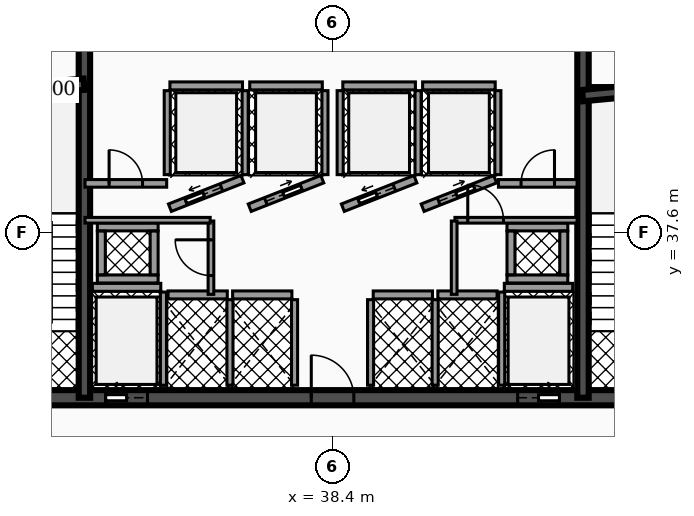
"""IFC4 building model, lengths in metres.
Left out: names, types, materials, properties, quantities, classifications, styles, units other than length and angle.
Written with IfcOpenShell. Run it as: python <this file> out.ifc"""

import sys

from ifc_helpers import new_model, si_unit, direction, frame, frame_2d, origin, place, context, subcontext, project, spatial, rectangle, extrude, element, fill, save


model = new_model("IFC4")
c1 = context("Model", 3, precision=1e-05, world=origin(), true_north=direction((0.0, 1.0)))
c2 = subcontext(c1, "Body", "Model", "MODEL_VIEW")
j1 = project(units=[si_unit("LENGTHUNIT", "METRE"), si_unit("PLANEANGLEUNIT", "RADIAN")], contexts=[c1])
p1 = place(None, origin())
s1 = spatial("IfcSite", under=j1, at=p1, CompositionType="ELEMENT")
p2 = place(p1, origin())
s2 = spatial("IfcBuilding", under=s1, at=p2, CompositionType="ELEMENT")
p3 = place(p2, frame((0.0, 0.0, 105.06)))
s3 = spatial("IfcBuildingStorey", under=s2, at=p3, CompositionType="ELEMENT", Elevation=105.06)
p4 = place(p3, frame((28.4, 33.25, 0.0), z_axis=(0.0, 0.0, 1.0), x_axis=(1.0, 0.0, 0.0)))
e1 = element("IfcWall", 1, at=p4, inside=s3, PredefinedType="SHEAR", context=c2, shape_type="SweptSolid", body=[
    extrude(rectangle(XDim=20.06, YDim=0.4, at=frame_2d((10.03, 0.0))), origin(), (0.0, 0.0, 1.0), 3.73),
])
p5 = place(p4, frame((4.03, 0.0, 0.0)))
e2 = element("IfcOpeningElement", 2, at=p5, cuts=e1, PredefinedType="OPENING", context=c2, shape_type="SweptSolid", body=[
    extrude(rectangle(XDim=1.1, YDim=2.15, at=frame_2d((0.55, 1.075))), frame((0.0, 0.21, 0.0), z_axis=(0.0, -1.0, 0.0), x_axis=(1.0, 0.0, 0.0)), (0.0, 0.0, 1.0), 0.42),
])
p6 = place(p4, frame((14.87, 0.0, 0.0)))
e3 = element("IfcOpeningElement", 3, at=p6, cuts=e1, PredefinedType="OPENING", context=c2, shape_type="SweptSolid", body=[
    extrude(rectangle(XDim=1.1, YDim=2.15, at=frame_2d((0.55, 1.075))), frame((0.0, 0.21, 0.0), z_axis=(0.0, -1.0, 0.0), x_axis=(1.0, 0.0, 0.0)), (0.0, 0.0, 1.0), 0.42),
])
p7 = place(p4, frame((1.31, 0.0, 0.0)))
e4 = element("IfcOpeningElement", 4, at=p7, cuts=e1, PredefinedType="OPENING", context=c2, shape_type="SweptSolid", body=[
    extrude(rectangle(XDim=1.1, YDim=2.2, at=frame_2d((0.55, 1.1))), frame((0.0, 0.21, 0.0), z_axis=(0.0, -1.0, 0.0), x_axis=(1.0, 0.0, 0.0)), (0.0, 0.0, 1.0), 0.42),
])
p8 = place(p4, frame((9.44, 0.0, 0.0)))
e5 = element("IfcOpeningElement", 5, at=p8, cuts=e1, PredefinedType="OPENING", context=c2, shape_type="SweptSolid", body=[
    extrude(rectangle(XDim=1.12, YDim=2.05, at=frame_2d((0.56, 1.025))), frame((0.0, 0.21, 0.0), z_axis=(0.0, -1.0, 0.0), x_axis=(1.0, 0.0, 0.0)), (0.0, 0.0, 1.0), 0.42),
])
p9 = place(p4, frame((17.65, 0.0, 0.0)))
e6 = element("IfcOpeningElement", 6, at=p9, cuts=e1, PredefinedType="OPENING", context=c2, shape_type="SweptSolid", body=[
    extrude(rectangle(XDim=1.1, YDim=2.2, at=frame_2d((0.55, 1.1))), frame((0.0, 0.21, 0.0), z_axis=(0.0, -1.0, 0.0), x_axis=(1.0, 0.0, 0.0)), (0.0, 0.0, 1.0), 0.42),
])
for number, where, z_axis, x_axis in (
    (7, (31.87, 33.25, 0.0), (0.0, 0.0, 1.0), (0.0, 1.0, 0.0)),
    (8, (44.99, 33.25, 0.0), (0.0, 0.0, 1.0), (0.0, 1.0, 0.0)),
):
    element("IfcWall", number, at=place(p3, frame(where, z_axis=z_axis, x_axis=x_axis)), inside=s3, PredefinedType="SHEAR", context=c2, shape_type="SweptSolid", body=[
        extrude(rectangle(XDim=10.2, YDim=0.3, at=frame_2d((5.1, 0.0))), origin(), (0.0, 0.0, 1.0), 3.73),
    ])
p10 = place(p3, frame((28.64, 41.2, 0.0), z_axis=(0.0, 0.0, 1.0), x_axis=(0.995687118776, 0.092774789157, 0.0)))
e9 = element("IfcWall", 9, at=p10, inside=s3, PredefinedType="SHEAR", context=c2, shape_type="SweptSolid", body=[
    extrude(rectangle(XDim=3.234, YDim=0.3, at=frame_2d((1.617, 0.0))), origin(), (0.0, 0.0, 1.0), 3.73),
])
p11 = place(p3, frame((44.98, 41.2, 0.0), z_axis=(0.0, 0.0, 1.0), x_axis=(0.995686468965, 0.09278176286, 0.0)))
e10 = element("IfcWall", 10, at=p11, inside=s3, PredefinedType="SHEAR", context=c2, shape_type="SweptSolid", body=[
    extrude(rectangle(XDim=3.234, YDim=0.3, at=frame_2d((1.617, 0.0))), origin(), (0.0, 0.0, 1.0), 3.73),
])
p12 = place(p3, frame((32.08, 36.155, 0.0), z_axis=(0.0, 0.0, 1.0), x_axis=(1.0, 0.0, 0.0)))
e11 = element("IfcWall", 11, at=p12, inside=s3, PredefinedType="SOLIDWALL", context=c2, shape_type="SweptSolid", body=[
    extrude(rectangle(XDim=1.8, YDim=0.21, at=frame_2d((0.9, 0.0))), origin(), (0.0, 0.0, 1.0), 2.702),
])
p13 = place(p3, frame((33.95, 33.58, 0.0), z_axis=(0.0, 0.0, 1.0), x_axis=(0.0, 1.0, 0.0)))
e12 = element("IfcWall", 12, at=p13, inside=s3, PredefinedType="SOLIDWALL", context=c2, shape_type="SweptSolid", body=[
    extrude(rectangle(XDim=2.45, YDim=0.16, at=frame_2d((1.225, 0.0))), origin(), (0.0, 0.0, 1.0), 2.702),
])
p14 = place(p3, frame((42.92, 36.155, 0.0), z_axis=(0.0, 0.0, 1.0), x_axis=(1.0, 0.0, 0.0)))
e13 = element("IfcWall", 13, at=p14, inside=s3, PredefinedType="SOLIDWALL", context=c2, shape_type="SweptSolid", body=[
    extrude(rectangle(XDim=1.8, YDim=0.21, at=frame_2d((0.9, 0.0))), origin(), (0.0, 0.0, 1.0), 2.702),
])
p15 = place(p3, frame((42.85, 33.58, 0.0), z_axis=(0.0, 0.0, 1.0), x_axis=(0.0, 1.0, 0.0)))
e14 = element("IfcWall", 14, at=p15, inside=s3, PredefinedType="SOLIDWALL", context=c2, shape_type="SweptSolid", body=[
    extrude(rectangle(XDim=2.45, YDim=0.16, at=frame_2d((1.225, 0.0))), origin(), (0.0, 0.0, 1.0), 2.702),
])
p16 = place(p3, frame((34.12, 38.25, 0.0), z_axis=(0.0, 0.0, 1.0), x_axis=(0.930804993012, 0.36551616241, 0.0)))
e15 = element("IfcWall", 15, at=p16, inside=s3, PredefinedType="SOLIDWALL", context=c2, shape_type="SweptSolid", body=[
    extrude(rectangle(XDim=2.052, YDim=0.21, at=frame_2d((1.026, 0.0))), origin(), (0.0, 0.0, 1.0), 2.702),
])
p17 = place(p16, frame((0.455, 0.0, 0.0)))
e16 = element("IfcOpeningElement", 16, at=p17, cuts=e15, PredefinedType="OPENING", context=c2, shape_type="SweptSolid", body=[
    extrude(rectangle(XDim=1.0, YDim=2.1, at=frame_2d((0.5, 1.05))), frame((0.0, 0.115, 0.0), z_axis=(0.0, -1.0, 0.0), x_axis=(1.0, 0.0, 0.0)), (0.0, 0.0, 1.0), 0.23),
])
p18 = place(p3, frame((34.12, 41.455, 0.0), z_axis=(0.0, 0.0, 1.0), x_axis=(1.0, 0.0, 0.0)))
e17 = element("IfcWall", 17, at=p18, inside=s3, PredefinedType="SOLIDWALL", context=c2, shape_type="SweptSolid", body=[
    extrude(rectangle(XDim=1.91, YDim=0.21, at=frame_2d((0.955, 0.0))), origin(), (0.0, 0.0, 1.0), 2.702),
])
for number, where, z_axis, x_axis in (
    (18, (34.05, 39.12, 0.0), (0.0, 0.0, 1.0), (0.0, 1.0, 0.0)),
    (19, (36.1, 39.12, 0.0), (0.0, 0.0, 1.0), (0.0, 1.0, 0.0)),
):
    element("IfcWall", number, at=place(p3, frame(where, z_axis=z_axis, x_axis=x_axis)), inside=s3, PredefinedType="SOLIDWALL", context=c2, shape_type="SweptSolid", body=[
        extrude(rectangle(XDim=2.21, YDim=0.16, at=frame_2d((1.105, 0.0))), origin(), (0.0, 0.0, 1.0), 2.702),
    ])
p19 = place(p3, frame((36.22, 38.25, 0.0), z_axis=(0.0, 0.0, 1.0), x_axis=(0.930804993012, 0.36551616241, 0.0)))
e20 = element("IfcWall", 20, at=p19, inside=s3, PredefinedType="SOLIDWALL", context=c2, shape_type="SweptSolid", body=[
    extrude(rectangle(XDim=2.052, YDim=0.21, at=frame_2d((1.026, 0.0))), origin(), (0.0, 0.0, 1.0), 2.702),
])
p20 = place(p19, frame((0.455, 0.0, 0.0)))
e21 = element("IfcOpeningElement", 21, at=p20, cuts=e20, PredefinedType="OPENING", context=c2, shape_type="SweptSolid", body=[
    extrude(rectangle(XDim=1.0, YDim=2.1, at=frame_2d((0.5, 1.05))), frame((0.0, 0.115, 0.0), z_axis=(0.0, -1.0, 0.0), x_axis=(1.0, 0.0, 0.0)), (0.0, 0.0, 1.0), 0.23),
])
p21 = place(p3, frame((36.22, 41.455, 0.0), z_axis=(0.0, 0.0, 1.0), x_axis=(1.0, 0.0, 0.0)))
e22 = element("IfcWall", 22, at=p21, inside=s3, PredefinedType="SOLIDWALL", context=c2, shape_type="SweptSolid", body=[
    extrude(rectangle(XDim=1.91, YDim=0.21, at=frame_2d((0.955, 0.0))), origin(), (0.0, 0.0, 1.0), 2.702),
])
p22 = place(p3, frame((38.2, 39.12, 0.0), z_axis=(0.0, 0.0, 1.0), x_axis=(0.0, 1.0, 0.0)))
e23 = element("IfcWall", 23, at=p22, inside=s3, PredefinedType="SOLIDWALL", context=c2, shape_type="SweptSolid", body=[
    extrude(rectangle(XDim=2.21, YDim=0.16, at=frame_2d((1.105, 0.0))), origin(), (0.0, 0.0, 1.0), 2.702),
])
p23 = place(p3, frame((38.67, 38.25, 0.0), z_axis=(0.0, 0.0, 1.0), x_axis=(0.930820886763, 0.3654756856, 0.0)))
e24 = element("IfcWall", 24, at=p23, inside=s3, PredefinedType="SOLIDWALL", context=c2, shape_type="SweptSolid", body=[
    extrude(rectangle(XDim=2.052, YDim=0.21, at=frame_2d((1.026, 0.0))), origin(), (0.0, 0.0, 1.0), 2.702),
])
p24 = place(p23, frame((0.455, 0.0, 0.0)))
e25 = element("IfcOpeningElement", 25, at=p24, cuts=e24, PredefinedType="OPENING", context=c2, shape_type="SweptSolid", body=[
    extrude(rectangle(XDim=1.0, YDim=2.1, at=frame_2d((0.5, 1.05))), frame((0.0, 0.115, 0.0), z_axis=(0.0, -1.0, 0.0), x_axis=(1.0, 0.0, 0.0)), (0.0, 0.0, 1.0), 0.23),
])
p25 = place(p3, frame((38.67, 41.455, 0.0), z_axis=(0.0, 0.0, 1.0), x_axis=(1.0, 0.0, 0.0)))
e26 = element("IfcWall", 26, at=p25, inside=s3, PredefinedType="SOLIDWALL", context=c2, shape_type="SweptSolid", body=[
    extrude(rectangle(XDim=1.91, YDim=0.21, at=frame_2d((0.955, 0.0))), origin(), (0.0, 0.0, 1.0), 2.702),
])
for number, where, z_axis, x_axis in (
    (27, (38.6, 39.12, 0.0), (0.0, 0.0, 1.0), (0.0, 1.0, 0.0)),
    (28, (40.65, 39.12, 0.0), (0.0, 0.0, 1.0), (0.0, 1.0, 0.0)),
):
    element("IfcWall", number, at=place(p3, frame(where, z_axis=z_axis, x_axis=x_axis)), inside=s3, PredefinedType="SOLIDWALL", context=c2, shape_type="SweptSolid", body=[
        extrude(rectangle(XDim=2.21, YDim=0.16, at=frame_2d((1.105, 0.0))), origin(), (0.0, 0.0, 1.0), 2.702),
    ])
p26 = place(p3, frame((40.77, 38.25, 0.0), z_axis=(0.0, 0.0, 1.0), x_axis=(0.930804993012, 0.36551616241, 0.0)))
e29 = element("IfcWall", 29, at=p26, inside=s3, PredefinedType="SOLIDWALL", context=c2, shape_type="SweptSolid", body=[
    extrude(rectangle(XDim=2.052, YDim=0.21, at=frame_2d((1.026, 0.0))), origin(), (0.0, 0.0, 1.0), 2.702),
])
p27 = place(p26, frame((0.455, 0.0, 0.0)))
e30 = element("IfcOpeningElement", 30, at=p27, cuts=e29, PredefinedType="OPENING", context=c2, shape_type="SweptSolid", body=[
    extrude(rectangle(XDim=1.0, YDim=2.1, at=frame_2d((0.5, 1.05))), frame((0.0, 0.115, 0.0), z_axis=(0.0, -1.0, 0.0), x_axis=(1.0, 0.0, 0.0)), (0.0, 0.0, 1.0), 0.23),
])
p28 = place(p3, frame((40.77, 41.455, 0.0), z_axis=(0.0, 0.0, 1.0), x_axis=(1.0, 0.0, 0.0)))
e31 = element("IfcWall", 31, at=p28, inside=s3, PredefinedType="SOLIDWALL", context=c2, shape_type="SweptSolid", body=[
    extrude(rectangle(XDim=1.91, YDim=0.21, at=frame_2d((0.955, 0.0))), origin(), (0.0, 0.0, 1.0), 2.702),
])
p29 = place(p3, frame((42.75, 39.12, 0.0), z_axis=(0.0, 0.0, 1.0), x_axis=(0.0, 1.0, 0.0)))
e32 = element("IfcWall", 32, at=p29, inside=s3, PredefinedType="SOLIDWALL", context=c2, shape_type="SweptSolid", body=[
    extrude(rectangle(XDim=2.21, YDim=0.16, at=frame_2d((1.105, 0.0))), origin(), (0.0, 0.0, 1.0), 2.702),
])
p30 = place(p3, frame((34.07, 35.955, 0.0), z_axis=(0.0, 0.0, 1.0), x_axis=(1.0, 0.0, 0.0)))
e33 = element("IfcWall", 33, at=p30, inside=s3, PredefinedType="SOLIDWALL", context=c2, shape_type="SweptSolid", body=[
    extrude(rectangle(XDim=1.56, YDim=0.21, at=frame_2d((0.78, 0.0))), origin(), (0.0, 0.0, 1.0), 2.702),
])
p31 = place(p3, frame((35.7, 33.58, 0.0), z_axis=(0.0, 0.0, 1.0), x_axis=(0.0, 1.0, 0.0)))
e34 = element("IfcWall", 34, at=p31, inside=s3, PredefinedType="SOLIDWALL", context=c2, shape_type="SweptSolid", body=[
    extrude(rectangle(XDim=2.25, YDim=0.16, at=frame_2d((1.125, 0.0))), origin(), (0.0, 0.0, 1.0), 2.702),
])
p32 = place(p3, frame((35.77, 35.955, 0.0), z_axis=(0.0, 0.0, 1.0), x_axis=(1.0, 0.0, 0.0)))
e35 = element("IfcWall", 35, at=p32, inside=s3, PredefinedType="SOLIDWALL", context=c2, shape_type="SweptSolid", body=[
    extrude(rectangle(XDim=1.56, YDim=0.21, at=frame_2d((0.78, 0.0))), origin(), (0.0, 0.0, 1.0), 2.702),
])
p33 = place(p3, frame((37.4, 33.58, 0.0), z_axis=(0.0, 0.0, 1.0), x_axis=(0.0, 1.0, 0.0)))
e36 = element("IfcWall", 36, at=p33, inside=s3, PredefinedType="SOLIDWALL", context=c2, shape_type="SweptSolid", body=[
    extrude(rectangle(XDim=2.25, YDim=0.16, at=frame_2d((1.125, 0.0))), origin(), (0.0, 0.0, 1.0), 2.702),
])
p34 = place(p3, frame((39.47, 35.955, 0.0), z_axis=(0.0, 0.0, 1.0), x_axis=(1.0, 0.0, 0.0)))
e37 = element("IfcWall", 37, at=p34, inside=s3, PredefinedType="SOLIDWALL", context=c2, shape_type="SweptSolid", body=[
    extrude(rectangle(XDim=1.56, YDim=0.21, at=frame_2d((0.78, 0.0))), origin(), (0.0, 0.0, 1.0), 2.702),
])
for number, where, z_axis, x_axis in (
    (38, (39.4, 33.58, 0.0), (0.0, 0.0, 1.0), (0.0, 1.0, 0.0)),
    (39, (41.1, 33.58, 0.0), (0.0, 0.0, 1.0), (0.0, 1.0, 0.0)),
):
    element("IfcWall", number, at=place(p3, frame(where, z_axis=z_axis, x_axis=x_axis)), inside=s3, PredefinedType="SOLIDWALL", context=c2, shape_type="SweptSolid", body=[
        extrude(rectangle(XDim=2.25, YDim=0.16, at=frame_2d((1.125, 0.0))), origin(), (0.0, 0.0, 1.0), 2.702),
    ])
p35 = place(p3, frame((41.17, 35.955, 0.0), z_axis=(0.0, 0.0, 1.0), x_axis=(1.0, 0.0, 0.0)))
e40 = element("IfcWall", 40, at=p35, inside=s3, PredefinedType="SOLIDWALL", context=c2, shape_type="SweptSolid", body=[
    extrude(rectangle(XDim=1.56, YDim=0.21, at=frame_2d((0.78, 0.0))), origin(), (0.0, 0.0, 1.0), 2.702),
])
for number, where, z_axis, x_axis in (
    (41, (32.21, 36.375, 0.0), (0.0, 0.0, 1.0), (1.0, 0.0, 0.0)),
    (42, (32.21, 37.745, 0.0), (0.0, 0.0, 1.0), (1.0, 0.0, 0.0)),
):
    element("IfcWall", number, at=place(p3, frame(where, z_axis=z_axis, x_axis=x_axis)), inside=s3, PredefinedType="SOLIDWALL", context=c2, shape_type="SweptSolid", body=[
        extrude(rectangle(XDim=1.6, YDim=0.21, at=frame_2d((0.8, 0.0))), origin(), (0.0, 0.0, 1.0), 3.73),
    ])
for number, where, z_axis, x_axis in (
    (43, (32.315, 36.485, 0.0), (0.0, 0.0, 1.0), (0.0, 1.0, 0.0)),
    (44, (33.705, 36.485, 0.0), (0.0, 0.0, 1.0), (0.0, 1.0, 0.0)),
):
    element("IfcWall", number, at=place(p3, frame(where, z_axis=z_axis, x_axis=x_axis)), inside=s3, PredefinedType="SOLIDWALL", context=c2, shape_type="SweptSolid", body=[
        extrude(rectangle(XDim=1.15, YDim=0.21, at=frame_2d((0.575, 0.0))), origin(), (0.0, 0.0, 1.0), 3.73),
    ])
for number, where, z_axis, x_axis in (
    (45, (42.99, 36.375, 0.0), (0.0, 0.0, 1.0), (1.0, 0.0, 0.0)),
    (46, (42.99, 37.745, 0.0), (0.0, 0.0, 1.0), (1.0, 0.0, 0.0)),
):
    element("IfcWall", number, at=place(p3, frame(where, z_axis=z_axis, x_axis=x_axis)), inside=s3, PredefinedType="SOLIDWALL", context=c2, shape_type="SweptSolid", body=[
        extrude(rectangle(XDim=1.6, YDim=0.21, at=frame_2d((0.8, 0.0))), origin(), (0.0, 0.0, 1.0), 3.73),
    ])
for number, where, z_axis, x_axis in (
    (47, (43.095, 36.485, 0.0), (0.0, 0.0, 1.0), (0.0, 1.0, 0.0)),
    (48, (44.485, 36.485, 0.0), (0.0, 0.0, 1.0), (0.0, 1.0, 0.0)),
):
    element("IfcWall", number, at=place(p3, frame(where, z_axis=z_axis, x_axis=x_axis)), inside=s3, PredefinedType="SOLIDWALL", context=c2, shape_type="SweptSolid", body=[
        extrude(rectangle(XDim=1.15, YDim=0.21, at=frame_2d((0.575, 0.0))), origin(), (0.0, 0.0, 1.0), 3.73),
    ])
p36 = place(p3, frame((35.2, 35.97, 0.0), z_axis=(0.0, 0.0, 1.0), x_axis=(0.0, 1.0, 0.0)))
e49 = element("IfcWall", 49, at=p36, inside=s3, PredefinedType="PARTITIONING", context=c2, shape_type="SweptSolid", body=[
    extrude(rectangle(XDim=1.93, YDim=0.15, at=frame_2d((0.965, 0.0))), origin(), (0.0, 0.0, 1.0), 2.687),
])
p37 = place(p36, frame((0.495, 0.0, 0.0)))
e50 = element("IfcOpeningElement", 50, at=p37, cuts=e49, PredefinedType="OPENING", context=c2, shape_type="SweptSolid", body=[
    extrude(rectangle(XDim=0.94, YDim=2.05, at=frame_2d((0.47, 1.025))), frame((0.0, 0.085, 0.0), z_axis=(0.0, -1.0, 0.0), x_axis=(1.0, 0.0, 0.0)), (0.0, 0.0, 1.0), 0.17),
])
p38 = place(p3, frame((31.885, 37.92, 0.0), z_axis=(0.0, 0.0, 1.0), x_axis=(1.0, 0.0, 0.0)))
e51 = element("IfcWall", 51, at=p38, inside=s3, PredefinedType="PARTITIONING", context=c2, shape_type="SweptSolid", body=[
    extrude(rectangle(XDim=3.295, YDim=0.15, at=frame_2d((1.647, 0.0))), origin(), (0.0, 0.0, 1.0), 2.687),
])
p39 = place(p3, frame((31.885, 38.89, 0.0), z_axis=(0.0, 0.0, 1.0), x_axis=(1.0, 0.0, 0.0)))
e52 = element("IfcWall", 52, at=p39, inside=s3, PredefinedType="PARTITIONING", context=c2, shape_type="SweptSolid", body=[
    extrude(rectangle(XDim=2.15, YDim=0.2, at=frame_2d((1.075, 0.0))), origin(), (0.0, 0.0, 1.0), 2.687),
])
p40 = place(p39, frame((0.635, 0.0, 0.0)))
e53 = element("IfcOpeningElement", 53, at=p40, cuts=e52, PredefinedType="OPENING", context=c2, shape_type="SweptSolid", body=[
    extrude(rectangle(XDim=0.88, YDim=2.05, at=frame_2d((0.44, 1.025))), frame((0.0, 0.11, 0.0), z_axis=(0.0, -1.0, 0.0), x_axis=(1.0, 0.0, 0.0)), (0.0, 0.0, 1.0), 0.22),
])
p41 = place(p3, frame((42.765, 38.89, 0.0), z_axis=(0.0, 0.0, 1.0), x_axis=(1.0, 0.0, 0.0)))
e54 = element("IfcWall", 54, at=p41, inside=s3, PredefinedType="PARTITIONING", context=c2, shape_type="SweptSolid", body=[
    extrude(rectangle(XDim=2.07, YDim=0.2, at=frame_2d((1.035, 0.0))), origin(), (0.0, 0.0, 1.0), 2.687),
])
p42 = place(p41, frame((0.595, 0.0, 0.0)))
e55 = element("IfcOpeningElement", 55, at=p42, cuts=e54, PredefinedType="OPENING", context=c2, shape_type="SweptSolid", body=[
    extrude(rectangle(XDim=0.88, YDim=2.05, at=frame_2d((0.44, 1.025))), frame((0.0, 0.11, 0.0), z_axis=(0.0, -1.0, 0.0), x_axis=(1.0, 0.0, 0.0)), (0.0, 0.0, 1.0), 0.22),
])
p43 = place(p3, frame((41.62, 37.92, 0.0), z_axis=(0.0, 0.0, 1.0), x_axis=(1.0, 0.0, 0.0)))
e56 = element("IfcWall", 56, at=p43, inside=s3, PredefinedType="PARTITIONING", context=c2, shape_type="SweptSolid", body=[
    extrude(rectangle(XDim=3.215, YDim=0.15, at=frame_2d((1.607, 0.0))), origin(), (0.0, 0.0, 1.0), 2.687),
])
p44 = place(p43, frame((0.337, 0.0, 0.0)))
e57 = element("IfcOpeningElement", 57, at=p44, cuts=e56, PredefinedType="OPENING", context=c2, shape_type="SweptSolid", body=[
    extrude(rectangle(XDim=0.94, YDim=2.05, at=frame_2d((0.47, 1.025))), frame((0.0, 0.085, 0.0), z_axis=(0.0, -1.0, 0.0), x_axis=(1.0, 0.0, 0.0)), (0.0, 0.0, 1.0), 0.17),
])
p45 = place(p3, frame((41.6, 35.97, 0.0), z_axis=(0.0, 0.0, 1.0), x_axis=(0.0, 1.0, 0.0)))
e58 = element("IfcWall", 58, at=p45, inside=s3, PredefinedType="PARTITIONING", context=c2, shape_type="SweptSolid", body=[
    extrude(rectangle(XDim=1.93, YDim=0.15, at=frame_2d((0.965, 0.0))), origin(), (0.0, 0.0, 1.0), 2.687),
])
p46 = place(p5, origin())
e59 = element("IfcDoor", 59, at=p46, inside=s3, OperationType="SLIDING_TO_LEFT", PredefinedType="DOOR", context=c2, shape_type="SweptSolid", body=[
    extrude(rectangle(XDim=1.1, YDim=2.15, at=frame_2d((0.55, 1.075))), frame((0.0, 0.025, 0.0), z_axis=(0.0, -1.0, 0.0), x_axis=(1.0, 0.0, 0.0)), (0.0, 0.0, 1.0), 0.05),
])
fill(e2, e59)
p47 = place(p6, origin())
e60 = element("IfcDoor", 60, at=p47, inside=s3, OperationType="SLIDING_TO_RIGHT", PredefinedType="DOOR", context=c2, shape_type="SweptSolid", body=[
    extrude(rectangle(XDim=1.1, YDim=2.15, at=frame_2d((0.55, 1.075))), frame((0.0, 0.025, 0.0), z_axis=(0.0, -1.0, 0.0), x_axis=(1.0, 0.0, 0.0)), (0.0, 0.0, 1.0), 0.05),
])
fill(e3, e60)
p48 = place(p17, origin())
e61 = element("IfcDoor", 61, at=p48, inside=s3, OperationType="SLIDING_TO_LEFT", PredefinedType="DOOR", context=c2, shape_type="SweptSolid", body=[
    extrude(rectangle(XDim=1.0, YDim=2.1, at=frame_2d((0.5, 1.05))), frame((0.0, 0.025, 0.0), z_axis=(0.0, -1.0, 0.0), x_axis=(1.0, 0.0, 0.0)), (0.0, 0.0, 1.0), 0.05),
])
fill(e16, e61)
p49 = place(p20, origin())
e62 = element("IfcDoor", 62, at=p49, inside=s3, OperationType="SLIDING_TO_RIGHT", PredefinedType="DOOR", context=c2, shape_type="SweptSolid", body=[
    extrude(rectangle(XDim=1.0, YDim=2.1, at=frame_2d((0.5, 1.05))), frame((0.0, 0.025, 0.0), z_axis=(0.0, -1.0, 0.0), x_axis=(1.0, 0.0, 0.0)), (0.0, 0.0, 1.0), 0.05),
])
fill(e21, e62)
p50 = place(p24, origin())
e63 = element("IfcDoor", 63, at=p50, inside=s3, OperationType="SLIDING_TO_LEFT", PredefinedType="DOOR", context=c2, shape_type="SweptSolid", body=[
    extrude(rectangle(XDim=1.0, YDim=2.1, at=frame_2d((0.5, 1.05))), frame((0.0, 0.025, 0.0), z_axis=(0.0, -1.0, 0.0), x_axis=(1.0, 0.0, 0.0)), (0.0, 0.0, 1.0), 0.05),
])
fill(e25, e63)
p51 = place(p27, origin())
e64 = element("IfcDoor", 64, at=p51, inside=s3, OperationType="SLIDING_TO_RIGHT", PredefinedType="DOOR", context=c2, shape_type="SweptSolid", body=[
    extrude(rectangle(XDim=1.0, YDim=2.1, at=frame_2d((0.5, 1.05))), frame((0.0, 0.025, 0.0), z_axis=(0.0, -1.0, 0.0), x_axis=(1.0, 0.0, 0.0)), (0.0, 0.0, 1.0), 0.05),
])
fill(e30, e64)
p52 = place(p8, origin())
e65 = element("IfcDoor", 65, at=p52, inside=s3, OperationType="SINGLE_SWING_LEFT", PredefinedType="DOOR", context=c2, shape_type="SweptSolid", body=[
    extrude(rectangle(XDim=1.12, YDim=2.05, at=frame_2d((0.56, 1.025))), frame((0.0, 0.025, 0.0), z_axis=(0.0, -1.0, 0.0), x_axis=(1.0, 0.0, 0.0)), (0.0, 0.0, 1.0), 0.05),
])
fill(e5, e65)
p53 = place(p37, origin())
e66 = element("IfcDoor", 66, at=p53, inside=s3, OperationType="SINGLE_SWING_RIGHT", PredefinedType="DOOR", context=c2, shape_type="SweptSolid", body=[
    extrude(rectangle(XDim=0.94, YDim=2.05, at=frame_2d((0.47, 1.025))), frame((0.0, 0.025, 0.0), z_axis=(0.0, -1.0, 0.0), x_axis=(1.0, 0.0, 0.0)), (0.0, 0.0, 1.0), 0.05),
])
fill(e50, e66)
p54 = place(p40, origin())
e67 = element("IfcDoor", 67, at=p54, inside=s3, OperationType="SINGLE_SWING_LEFT", PredefinedType="DOOR", context=c2, shape_type="SweptSolid", body=[
    extrude(rectangle(XDim=0.88, YDim=2.05, at=frame_2d((0.44, 1.025))), frame((0.0, 0.025, 0.0), z_axis=(0.0, -1.0, 0.0), x_axis=(1.0, 0.0, 0.0)), (0.0, 0.0, 1.0), 0.05),
])
fill(e53, e67)
p55 = place(p42, origin())
e68 = element("IfcDoor", 68, at=p55, inside=s3, OperationType="SINGLE_SWING_RIGHT", PredefinedType="DOOR", context=c2, shape_type="SweptSolid", body=[
    extrude(rectangle(XDim=0.88, YDim=2.05, at=frame_2d((0.44, 1.025))), frame((0.0, 0.025, 0.0), z_axis=(0.0, -1.0, 0.0), x_axis=(1.0, 0.0, 0.0)), (0.0, 0.0, 1.0), 0.05),
])
fill(e55, e68)
p56 = place(p44, origin())
e69 = element("IfcDoor", 69, at=p56, inside=s3, OperationType="SINGLE_SWING_LEFT", PredefinedType="DOOR", context=c2, shape_type="SweptSolid", body=[
    extrude(rectangle(XDim=0.94, YDim=2.05, at=frame_2d((0.47, 1.025))), frame((0.0, 0.025, 0.0), z_axis=(0.0, -1.0, 0.0), x_axis=(1.0, 0.0, 0.0)), (0.0, 0.0, 1.0), 0.05),
])
fill(e57, e69)
save(model, sys.argv[1])
